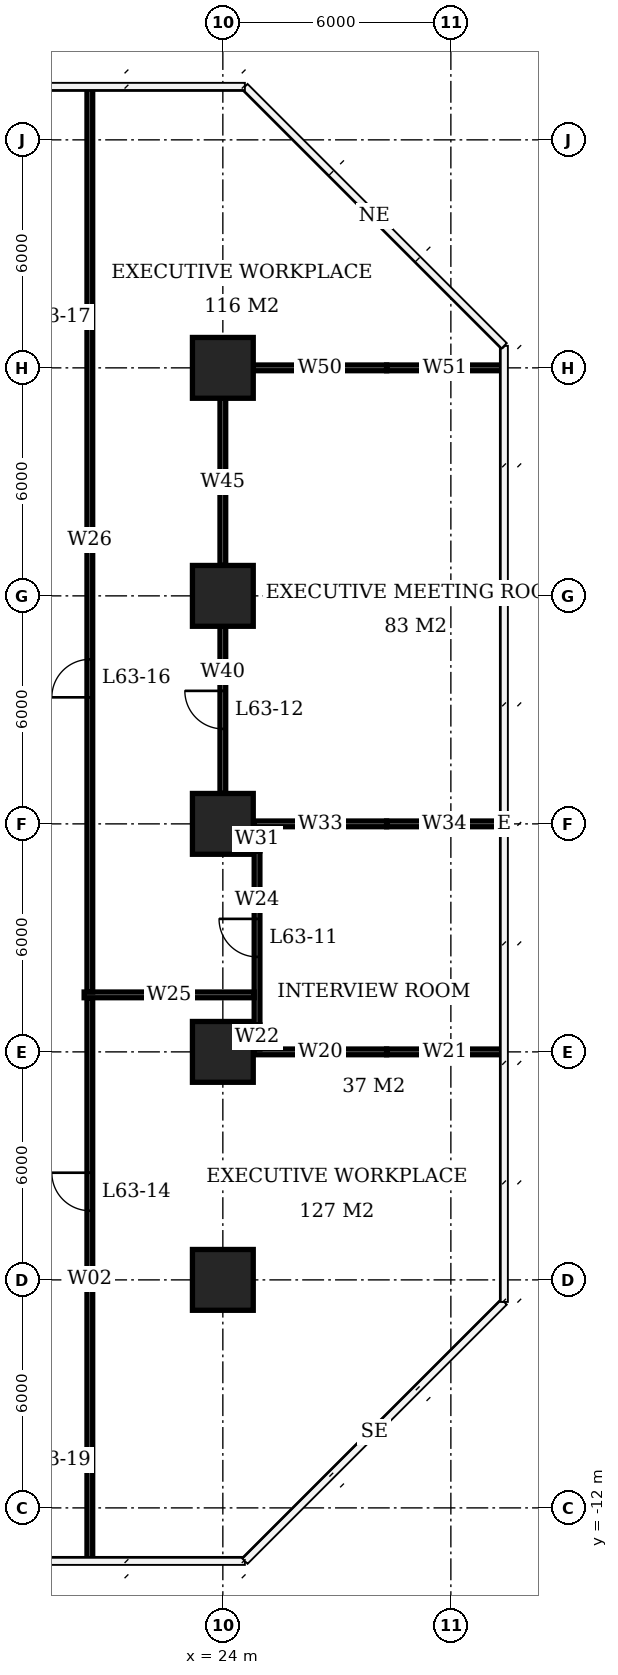
"""IFC4 building model, lengths in metres.
Left out: names, types, materials, properties, quantities, classifications, styles, units other than length and angle.
Written with IfcOpenShell. Run it as: python <this file> out.ifc"""

import sys

from ifc_helpers import new_model, si_unit, direction, frame, frame_2d, origin, origin_2d, place, context, subcontext, project, spatial, rectangle, extrude, element, fill, save


model = new_model("IFC4")
c1 = context("Model", 3, precision=1e-05, world=origin(), true_north=direction((0.0, 1.0)))
c2 = subcontext(c1, "Body", "Model", "MODEL_VIEW")
j1 = project(units=[si_unit("LENGTHUNIT", "METRE"), si_unit("PLANEANGLEUNIT", "RADIAN")], contexts=[c1])
p1 = place(None, origin())
s1 = spatial("IfcSite", under=j1, at=p1, CompositionType="ELEMENT")
p2 = place(p1, origin())
s2 = spatial("IfcBuilding", under=s1, at=p2, CompositionType="ELEMENT")
p3 = place(p2, frame((0.0, 0.0, 256.7)))
s3 = spatial("IfcBuildingStorey", under=s2, at=p3, CompositionType="ELEMENT", Elevation=256.7)
for number, where, z_axis, x_axis in (
    (1, (24.0, -6.0, 0.0), (0.0, 0.0, 1.0), (1.0, 0.0, 0.0)),
    (2, (24.0, 0.0, 0.0), (0.0, 0.0, 1.0), (1.0, 0.0, 0.0)),
    (3, (24.0, 6.0, 0.0), (0.0, 0.0, 1.0), (1.0, 0.0, 0.0)),
    (4, (24.0, 12.0, 0.0), (0.0, 0.0, 1.0), (1.0, 0.0, 0.0)),
    (5, (24.0, 18.0, 0.0), (0.0, 0.0, 1.0), (1.0, 0.0, 0.0)),
):
    element("IfcColumn", number, at=place(p3, frame(where, z_axis=z_axis, x_axis=x_axis)), inside=s3, PredefinedType="COLUMN", context=c2, shape_type="SweptSolid", body=[
        extrude(rectangle(XDim=1.6, YDim=1.6, at=origin_2d()), origin(), (0.0, 0.0, 1.0), 3.9),
    ])
p4 = place(p3, frame((24.825, 0.0, 0.0), z_axis=(0.0, 0.0, 1.0), x_axis=(1.0, 0.0, 0.0)))
e6 = element("IfcWall", 6, at=p4, inside=s3, PredefinedType="PARTITIONING", context=c2, shape_type="SweptSolid", body=[
    extrude(rectangle(XDim=3.485, YDim=0.15, at=frame_2d((1.743, 0.0))), origin(), (0.0, 0.0, 1.0), 2.65),
])
p5 = place(p3, frame((28.31, 0.0, 0.0), z_axis=(0.0, 0.0, 1.0), x_axis=(1.0, 0.0, 0.0)))
e7 = element("IfcWall", 7, at=p5, inside=s3, PredefinedType="PARTITIONING", context=c2, shape_type="SweptSolid", body=[
    extrude(rectangle(XDim=3.065, YDim=0.15, at=frame_2d((1.532, 0.0))), origin(), (0.0, 0.0, 1.0), 3.65),
])
p6 = place(p3, frame((24.825, 6.0, 0.0), z_axis=(0.0, 0.0, 1.0), x_axis=(1.0, 0.0, 0.0)))
e8 = element("IfcWall", 8, at=p6, inside=s3, PredefinedType="PARTITIONING", context=c2, shape_type="SweptSolid", body=[
    extrude(rectangle(XDim=3.485, YDim=0.15, at=frame_2d((1.743, 0.0))), origin(), (0.0, 0.0, 1.0), 2.65),
])
p7 = place(p3, frame((28.31, 6.0, 0.0), z_axis=(0.0, 0.0, 1.0), x_axis=(1.0, 0.0, 0.0)))
e9 = element("IfcWall", 9, at=p7, inside=s3, PredefinedType="PARTITIONING", context=c2, shape_type="SweptSolid", body=[
    extrude(rectangle(XDim=3.04, YDim=0.15, at=frame_2d((1.52, 0.0))), origin(), (0.0, 0.0, 1.0), 3.65),
])
p8 = place(p3, frame((24.8, 18.0, 0.0), z_axis=(0.0, 0.0, 1.0), x_axis=(1.0, 0.0, 0.0)))
e10 = element("IfcWall", 10, at=p8, inside=s3, PredefinedType="PARTITIONING", context=c2, shape_type="SweptSolid", body=[
    extrude(rectangle(XDim=3.51, YDim=0.15, at=frame_2d((1.755, 0.0))), origin(), (0.0, 0.0, 1.0), 2.65),
])
p9 = place(p3, frame((28.31, 18.0, 0.0), z_axis=(0.0, 0.0, 1.0), x_axis=(1.0, 0.0, 0.0)))
e11 = element("IfcWall", 11, at=p9, inside=s3, PredefinedType="PARTITIONING", context=c2, shape_type="SweptSolid", body=[
    extrude(rectangle(XDim=3.065, YDim=0.15, at=frame_2d((1.532, 0.0))), origin(), (0.0, 0.0, 1.0), 3.65),
])
p10 = place(p3, frame((24.0, 6.8, 0.0), z_axis=(0.0, 0.0, 1.0), x_axis=(0.0, 1.0, 0.0)))
e12 = element("IfcWall", 12, at=p10, inside=s3, PredefinedType="PARTITIONING", context=c2, shape_type="SweptSolid", body=[
    extrude(rectangle(XDim=4.4, YDim=0.15, at=frame_2d((2.2, 0.0))), origin(), (0.0, 0.0, 1.0), 3.65),
])
p11 = place(p10, frame((1.7, 0.0, 0.0)))
e13 = element("IfcOpeningElement", 13, at=p11, cuts=e12, PredefinedType="OPENING", context=c2, shape_type="SweptSolid", body=[
    extrude(rectangle(XDim=1.0, YDim=2.4, at=frame_2d((0.5, 1.2))), frame((0.0, 0.085, 0.0), z_axis=(0.0, -1.0, 0.0), x_axis=(1.0, 0.0, 0.0)), (0.0, 0.0, 1.0), 0.17),
])
p12 = place(p3, frame((24.0, 12.8, 0.0), z_axis=(0.0, 0.0, 1.0), x_axis=(0.0, 1.0, 0.0)))
e14 = element("IfcWall", 14, at=p12, inside=s3, PredefinedType="PARTITIONING", context=c2, shape_type="SweptSolid", body=[
    extrude(rectangle(XDim=4.4, YDim=0.15, at=frame_2d((2.2, 0.0))), origin(), (0.0, 0.0, 1.0), 3.65),
])
p13 = place(p3, frame((24.9, 0.075, 0.0), z_axis=(0.0, 0.0, 1.0), x_axis=(0.0, 1.0, 0.0)))
e15 = element("IfcWall", 15, at=p13, inside=s3, PredefinedType="PARTITIONING", context=c2, shape_type="SweptSolid", body=[
    extrude(rectangle(XDim=0.635, YDim=0.15, at=frame_2d((0.317, 0.0))), origin(), (0.0, 0.0, 1.0), 2.65),
])
p14 = place(p3, frame((24.9, 0.71, 0.0), z_axis=(0.0, 0.0, 1.0), x_axis=(0.0, 1.0, 0.0)))
e16 = element("IfcWall", 16, at=p14, inside=s3, PredefinedType="PARTITIONING", context=c2, shape_type="SweptSolid", body=[
    extrude(rectangle(XDim=4.58, YDim=0.15, at=frame_2d((2.29, 0.0))), origin(), (0.0, 0.0, 1.0), 3.65),
])
p15 = place(p14, frame((1.79, 0.0, 0.0)))
e17 = element("IfcOpeningElement", 17, at=p15, cuts=e16, PredefinedType="OPENING", context=c2, shape_type="SweptSolid", body=[
    extrude(rectangle(XDim=1.0, YDim=2.4, at=frame_2d((0.5, 1.2))), frame((0.0, 0.085, 0.0), z_axis=(0.0, -1.0, 0.0), x_axis=(1.0, 0.0, 0.0)), (0.0, 0.0, 1.0), 0.17),
])
p16 = place(p3, frame((24.9, 5.29, 0.0), z_axis=(0.0, 0.0, 1.0), x_axis=(0.0, 1.0, 0.0)))
e18 = element("IfcWall", 18, at=p16, inside=s3, PredefinedType="PARTITIONING", context=c2, shape_type="SweptSolid", body=[
    extrude(rectangle(XDim=0.635, YDim=0.15, at=frame_2d((0.317, 0.0))), origin(), (0.0, 0.0, 1.0), 2.65),
])
p17 = place(p3, frame((20.5, -13.375, 0.0), z_axis=(0.0, 0.0, 1.0), x_axis=(0.0, 1.0, 0.0)))
e19 = element("IfcWall", 19, at=p17, inside=s3, PredefinedType="PARTITIONING", context=c2, shape_type="SweptSolid", body=[
    extrude(rectangle(XDim=14.8, YDim=0.15, at=frame_2d((7.4, 0.0))), origin(), (0.0, 0.0, 1.0), 3.65),
])
p18 = place(p17, frame((9.195, 0.0, 0.0)))
e20 = element("IfcOpeningElement", 20, at=p18, cuts=e19, PredefinedType="OPENING", context=c2, shape_type="SweptSolid", body=[
    extrude(rectangle(XDim=1.0, YDim=2.4, at=frame_2d((0.5, 1.2))), frame((0.0, 0.085, 0.0), z_axis=(0.0, -1.0, 0.0), x_axis=(1.0, 0.0, 0.0)), (0.0, 0.0, 1.0), 0.17),
])
p19 = place(p3, frame((20.5, 1.575, 0.0), z_axis=(0.0, 0.0, 1.0), x_axis=(0.0, 1.0, 0.0)))
e21 = element("IfcWall", 21, at=p19, inside=s3, PredefinedType="PARTITIONING", context=c2, shape_type="SweptSolid", body=[
    extrude(rectangle(XDim=23.8, YDim=0.15, at=frame_2d((11.9, 0.0))), origin(), (0.0, 0.0, 1.0), 3.65),
])
p20 = place(p19, frame((7.755, 0.0, 0.0)))
e22 = element("IfcOpeningElement", 22, at=p20, cuts=e21, PredefinedType="OPENING", context=c2, shape_type="SweptSolid", body=[
    extrude(rectangle(XDim=1.0, YDim=2.4, at=frame_2d((0.5, 1.2))), frame((0.0, 0.085, 0.0), z_axis=(0.0, -1.0, 0.0), x_axis=(1.0, 0.0, 0.0)), (0.0, 0.0, 1.0), 0.17),
])
p21 = place(p3, frame((20.35, 1.5, 0.0), z_axis=(0.0, 0.0, 1.0), x_axis=(1.0, 0.0, 0.0)))
e23 = element("IfcWall", 23, at=p21, inside=s3, PredefinedType="PARTITIONING", context=c2, shape_type="SweptSolid", body=[
    extrude(rectangle(XDim=4.475, YDim=0.15, at=frame_2d((2.237, 0.0))), origin(), (0.0, 0.0, 1.0), 3.65),
])
p22 = place(p15, origin())
e24 = element("IfcDoor", 24, at=p22, inside=s3, OperationType="SINGLE_SWING_RIGHT", PredefinedType="DOOR", context=c2, shape_type="SweptSolid", body=[
    extrude(rectangle(XDim=1.0, YDim=2.4, at=frame_2d((0.5, 1.2))), frame((0.0, 0.025, 0.0), z_axis=(0.0, -1.0, 0.0), x_axis=(1.0, 0.0, 0.0)), (0.0, 0.0, 1.0), 0.05),
])
fill(e17, e24)
p23 = place(p11, origin())
e25 = element("IfcDoor", 25, at=p23, inside=s3, OperationType="SINGLE_SWING_RIGHT", PredefinedType="DOOR", context=c2, shape_type="SweptSolid", body=[
    extrude(rectangle(XDim=1.0, YDim=2.4, at=frame_2d((0.5, 1.2))), frame((0.0, 0.025, 0.0), z_axis=(0.0, -1.0, 0.0), x_axis=(1.0, 0.0, 0.0)), (0.0, 0.0, 1.0), 0.05),
])
fill(e13, e25)
p24 = place(p18, origin())
e26 = element("IfcDoor", 26, at=p24, inside=s3, OperationType="SINGLE_SWING_RIGHT", PredefinedType="DOOR", context=c2, shape_type="SweptSolid", body=[
    extrude(rectangle(XDim=1.0, YDim=2.4, at=frame_2d((0.5, 1.2))), frame((0.0, 0.025, 0.0), z_axis=(0.0, -1.0, 0.0), x_axis=(1.0, 0.0, 0.0)), (0.0, 0.0, 1.0), 0.05),
])
fill(e20, e26)
p25 = place(p20, origin())
e27 = element("IfcDoor", 27, at=p25, inside=s3, OperationType="SINGLE_SWING_LEFT", PredefinedType="DOOR", context=c2, shape_type="SweptSolid", body=[
    extrude(rectangle(XDim=1.0, YDim=2.4, at=frame_2d((0.5, 1.2))), frame((0.0, 0.025, 0.0), z_axis=(0.0, -1.0, 0.0), x_axis=(1.0, 0.0, 0.0)), (0.0, 0.0, 1.0), 0.05),
])
fill(e22, e27)
save(model, sys.argv[1])
